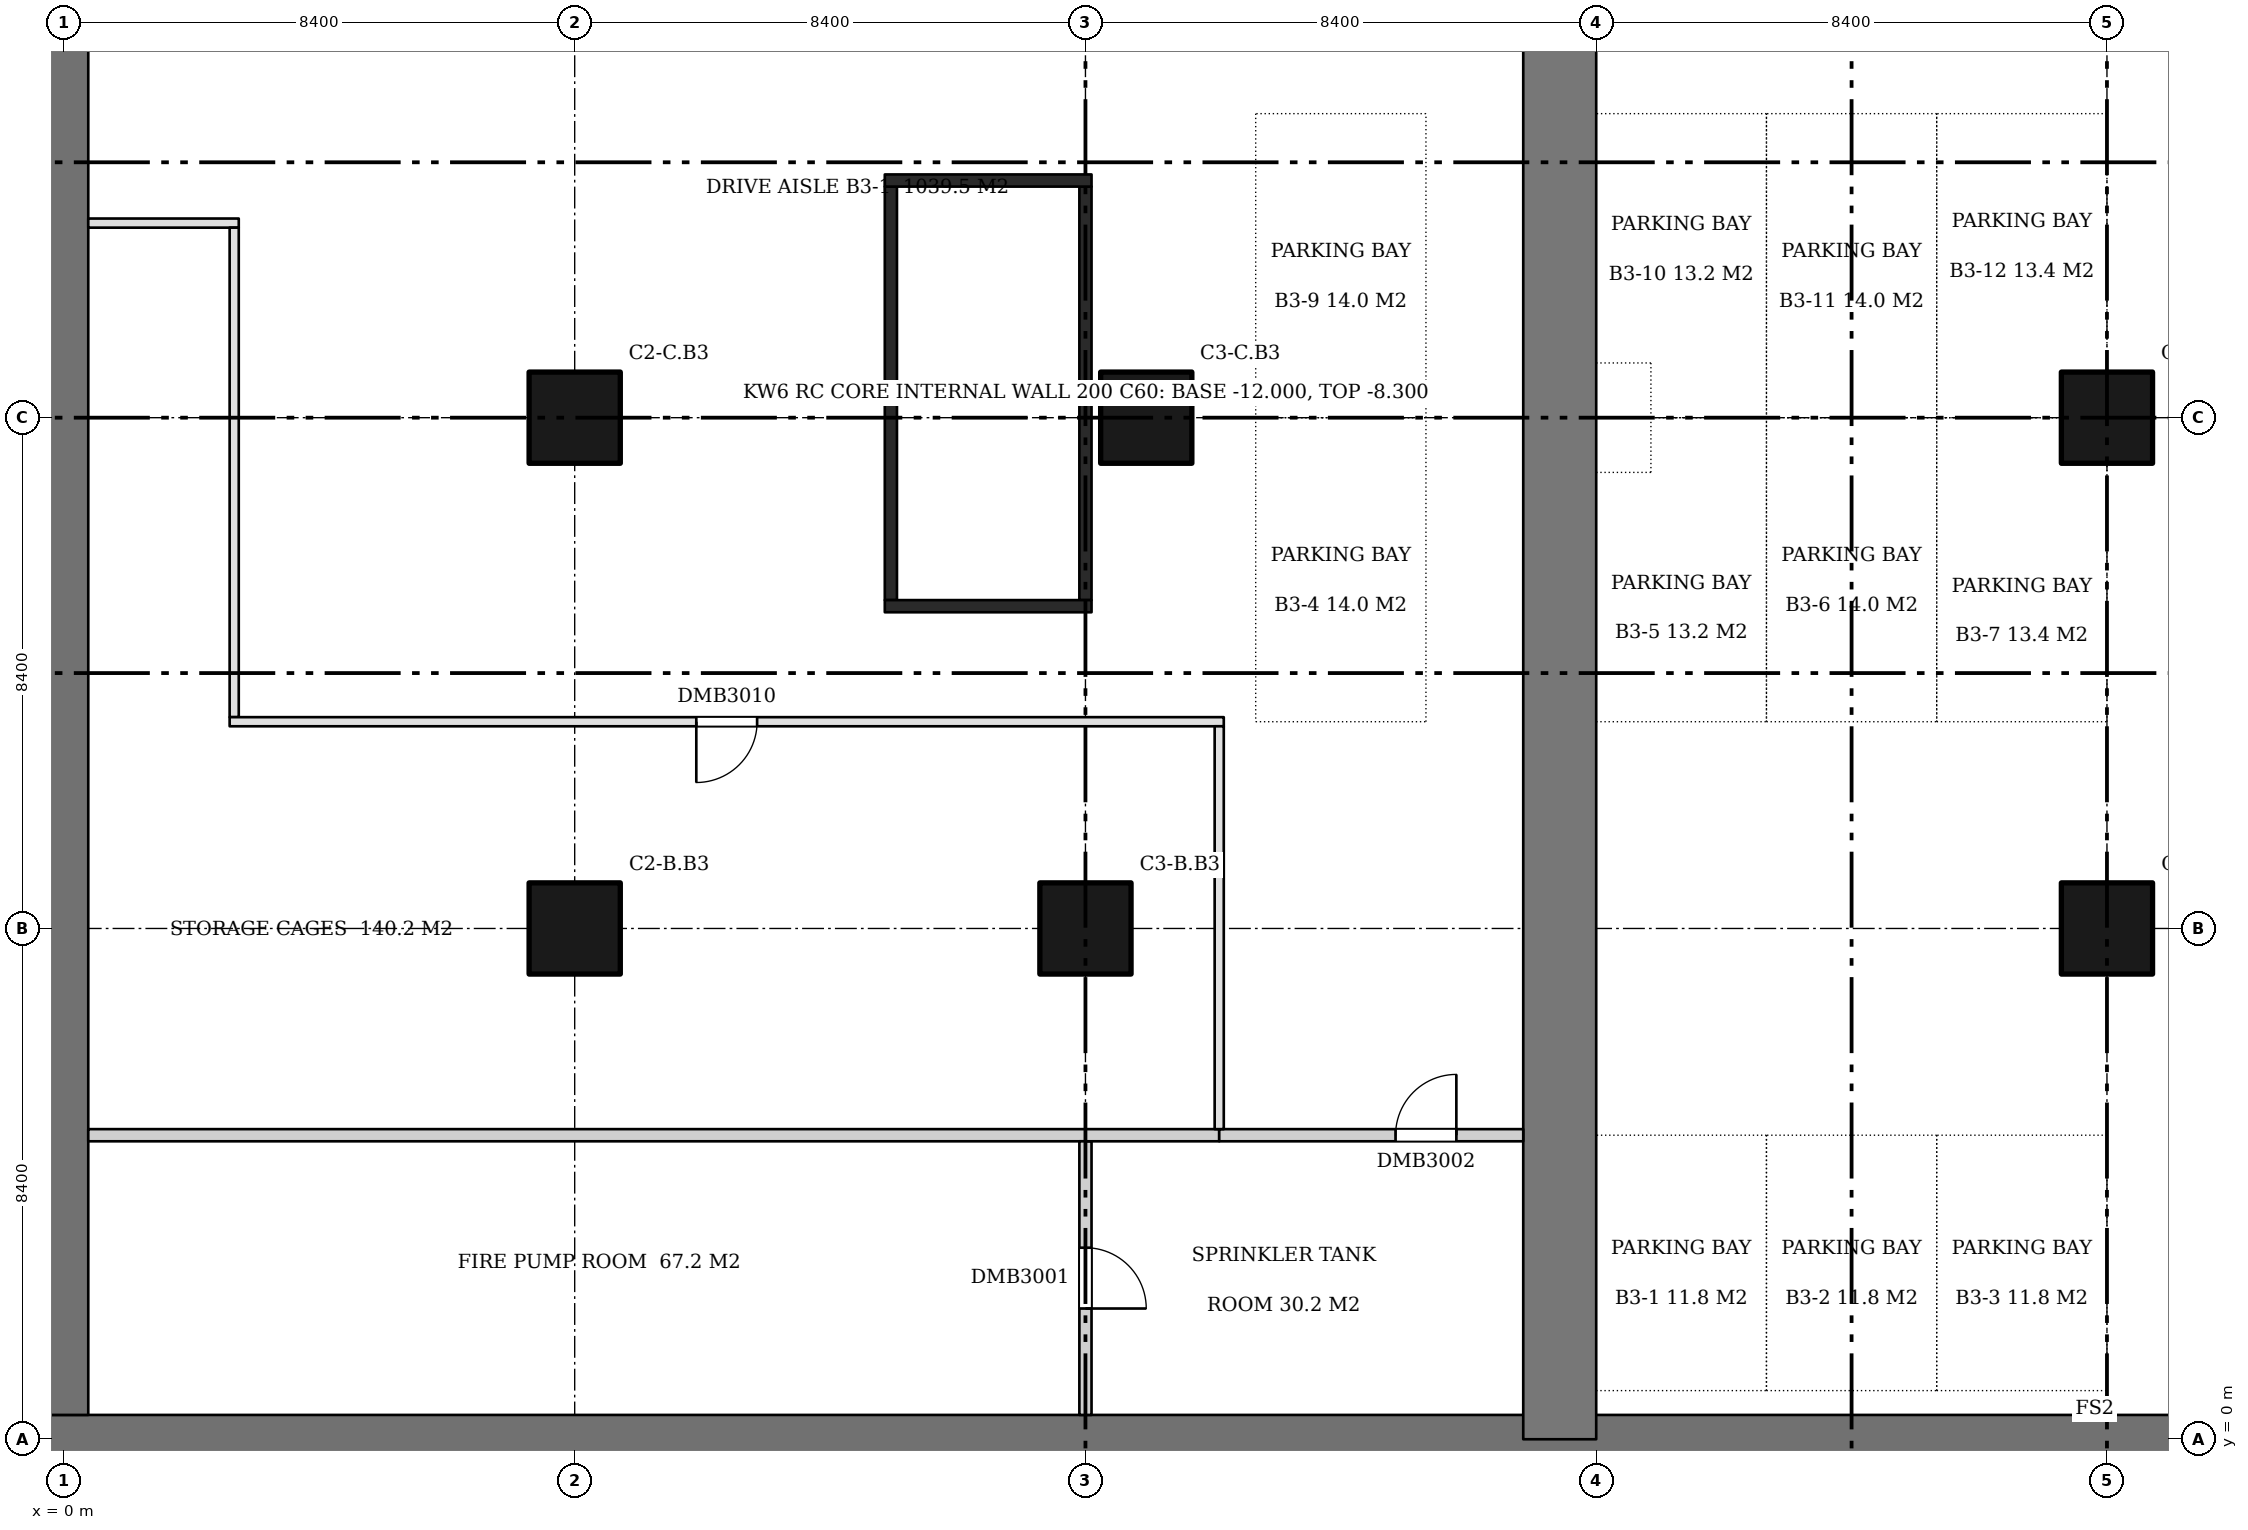
"""IFC4 building model, lengths in metres.
Left out: names, types, materials, properties, quantities, classifications, styles, units other than length and angle.
Written with IfcOpenShell. Run it as: python <this file> out.ifc"""

import sys

from ifc_helpers import new_model, si_unit, direction, frame, frame_2d, origin, origin_2d, place, context, subcontext, project, spatial, rectangle, extrude, element, fill, save


model = new_model("IFC4")
c1 = context("Model", 3, precision=1e-05, world=origin(), true_north=direction((0.0, 1.0)))
c2 = subcontext(c1, "Body", "Model", "MODEL_VIEW")
j1 = project(units=[si_unit("LENGTHUNIT", "METRE"), si_unit("PLANEANGLEUNIT", "RADIAN")], contexts=[c1])
p1 = place(None, origin())
s1 = spatial("IfcSite", under=j1, at=p1, CompositionType="ELEMENT")
p2 = place(p1, origin())
s2 = spatial("IfcBuilding", under=s1, at=p2, CompositionType="ELEMENT")
p3 = place(p2, frame((0.0, 0.0, -12.0)))
s3 = spatial("IfcBuildingStorey", under=s2, at=p3, CompositionType="ELEMENT", Elevation=-12.0)
p4 = place(p3, frame((-0.4, 0.0, 0.0), z_axis=(0.0, 0.0, 1.0), x_axis=(1.0, 0.0, 0.0)))
e1 = element("IfcWall", 1, at=p4, inside=s3, PredefinedType="SOLIDWALL", context=c2, shape_type="SweptSolid", body=[
    extrude(rectangle(XDim=67.6, YDim=0.8, at=frame_2d((33.8, 0.0))), origin(), (0.0, 0.0, 1.0), 3.7),
])
p5 = place(p3, frame((0.0, 0.4, 0.0), z_axis=(0.0, 0.0, 1.0), x_axis=(0.0, 1.0, 0.0)))
e2 = element("IfcWall", 2, at=p5, inside=s3, PredefinedType="SOLIDWALL", context=c2, shape_type="SweptSolid", body=[
    extrude(rectangle(XDim=58.0, YDim=0.8, at=frame_2d((29.0, 0.0))), origin(), (0.0, 0.0, 1.0), 3.7),
])
p6 = place(p3, frame((24.6, 0.0, 0.0), z_axis=(0.0, 0.0, 1.0), x_axis=(0.0, 1.0, 0.0)))
e3 = element("IfcWall", 3, at=p6, inside=s3, PredefinedType="SHEAR", context=c2, shape_type="SweptSolid", body=[
    extrude(rectangle(XDim=25.2, YDim=1.2, at=frame_2d((12.6, 0.0))), origin(), (0.0, 0.0, 1.0), 3.7),
])
for number, where, z_axis, x_axis in (
    (4, (8.4, 8.4, 0.0), (0.0, 0.0, 1.0), (1.0, 0.0, 0.0)),
    (5, (8.4, 16.8, 0.0), (0.0, 0.0, 1.0), (1.0, 0.0, 0.0)),
    (6, (16.8, 8.4, 0.0), (0.0, 0.0, 1.0), (1.0, 0.0, 0.0)),
    (7, (17.8, 16.8, 0.0), (0.0, 0.0, 1.0), (1.0, 0.0, 0.0)),
    (8, (33.6, 8.4, 0.0), (0.0, 0.0, 1.0), (1.0, 0.0, 0.0)),
    (9, (33.6, 16.8, 0.0), (0.0, 0.0, 1.0), (1.0, 0.0, 0.0)),
):
    element("IfcColumn", number, at=place(p3, frame(where, z_axis=z_axis, x_axis=x_axis)), inside=s3, PredefinedType="COLUMN", context=c2, shape_type="SweptSolid", body=[
        extrude(rectangle(XDim=1.5, YDim=1.5, at=origin_2d()), origin(), (0.0, 0.0, 1.0), 3.7),
    ])
for number, where, z_axis, x_axis in (
    (10, (13.6, 13.8, 0.0), (0.0, 0.0, 1.0), (0.0, 1.0, 0.0)),
    (11, (16.8, 13.8, 0.0), (0.0, 0.0, 1.0), (0.0, 1.0, 0.0)),
):
    element("IfcWall", number, at=place(p3, frame(where, z_axis=z_axis, x_axis=x_axis)), inside=s3, PredefinedType="SHEAR", context=c2, shape_type="SweptSolid", body=[
        extrude(rectangle(XDim=6.8, YDim=0.2, at=frame_2d((3.4, 0.0))), origin(), (0.0, 0.0, 1.0), 3.7),
    ])
for number, where, z_axis, x_axis in (
    (12, (13.5, 13.7, 0.0), (0.0, 0.0, 1.0), (1.0, 0.0, 0.0)),
    (13, (13.5, 20.7, 0.0), (0.0, 0.0, 1.0), (1.0, 0.0, 0.0)),
):
    element("IfcWall", number, at=place(p3, frame(where, z_axis=z_axis, x_axis=x_axis)), inside=s3, PredefinedType="SHEAR", context=c2, shape_type="SweptSolid", body=[
        extrude(rectangle(XDim=3.4, YDim=0.2, at=frame_2d((1.7, 0.0))), origin(), (0.0, 0.0, 1.0), 3.7),
    ])
p7 = place(p3, frame((0.4, 5.0, 0.0), z_axis=(0.0, 0.0, 1.0), x_axis=(1.0, 0.0, 0.0)))
e14 = element("IfcWall", 14, at=p7, inside=s3, PredefinedType="PARTITIONING", context=c2, shape_type="SweptSolid", body=[
    extrude(rectangle(XDim=16.4, YDim=0.2, at=frame_2d((8.2, 0.0))), origin(), (0.0, 0.0, 1.0), 3.7),
])
p8 = place(p3, frame((0.4, 20.0, 0.0), z_axis=(0.0, 0.0, 1.0), x_axis=(1.0, 0.0, 0.0)))
e15 = element("IfcWall", 15, at=p8, inside=s3, PredefinedType="PARTITIONING", context=c2, shape_type="SweptSolid", body=[
    extrude(rectangle(XDim=2.475, YDim=0.15, at=frame_2d((1.238, 0.0))), origin(), (0.0, 0.0, 1.0), 3.7),
])
p9 = place(p3, frame((2.8, 11.875, 0.0), z_axis=(0.0, 0.0, 1.0), x_axis=(0.0, 1.0, 0.0)))
e16 = element("IfcWall", 16, at=p9, inside=s3, PredefinedType="PARTITIONING", context=c2, shape_type="SweptSolid", body=[
    extrude(rectangle(XDim=8.05, YDim=0.15, at=frame_2d((4.025, 0.0))), origin(), (0.0, 0.0, 1.0), 3.7),
])
p10 = place(p3, frame((2.725, 11.8, 0.0), z_axis=(0.0, 0.0, 1.0), x_axis=(1.0, 0.0, 0.0)))
e17 = element("IfcWall", 17, at=p10, inside=s3, PredefinedType="PARTITIONING", context=c2, shape_type="SweptSolid", body=[
    extrude(rectangle(XDim=16.35, YDim=0.15, at=frame_2d((8.175, 0.0))), origin(), (0.0, 0.0, 1.0), 3.7),
])
p11 = place(p10, frame((7.675, 0.0, 0.0)))
e18 = element("IfcOpeningElement", 18, at=p11, cuts=e17, PredefinedType="OPENING", context=c2, shape_type="SweptSolid", body=[
    extrude(rectangle(XDim=1.0, YDim=2.1, at=frame_2d((0.5, 1.05))), frame((0.0, 0.085, 0.0), z_axis=(0.0, -1.0, 0.0), x_axis=(1.0, 0.0, 0.0)), (0.0, 0.0, 1.0), 0.17),
])
p12 = place(p3, frame((16.8, 0.4, 0.0), z_axis=(0.0, 0.0, 1.0), x_axis=(0.0, 1.0, 0.0)))
e19 = element("IfcWall", 19, at=p12, inside=s3, PredefinedType="PARTITIONING", context=c2, shape_type="SweptSolid", body=[
    extrude(rectangle(XDim=4.5, YDim=0.2, at=frame_2d((2.25, 0.0))), origin(), (0.0, 0.0, 1.0), 3.7),
])
p13 = place(p12, frame((1.75, 0.0, 0.0)))
e20 = element("IfcOpeningElement", 20, at=p13, cuts=e19, PredefinedType="OPENING", context=c2, shape_type="SweptSolid", body=[
    extrude(rectangle(XDim=1.0, YDim=2.1, at=frame_2d((0.5, 1.05))), frame((0.0, 0.11, 0.0), z_axis=(0.0, -1.0, 0.0), x_axis=(1.0, 0.0, 0.0)), (0.0, 0.0, 1.0), 0.22),
])
p14 = place(p3, frame((16.8, 5.0, 0.0), z_axis=(0.0, 0.0, 1.0), x_axis=(1.0, 0.0, 0.0)))
e21 = element("IfcWall", 21, at=p14, inside=s3, PredefinedType="PARTITIONING", context=c2, shape_type="SweptSolid", body=[
    extrude(rectangle(XDim=2.2, YDim=0.2, at=frame_2d((1.1, 0.0))), origin(), (0.0, 0.0, 1.0), 3.7),
])
p15 = place(p3, frame((19.0, 5.1, 0.0), z_axis=(0.0, 0.0, 1.0), x_axis=(0.0, 1.0, 0.0)))
e22 = element("IfcWall", 22, at=p15, inside=s3, PredefinedType="PARTITIONING", context=c2, shape_type="SweptSolid", body=[
    extrude(rectangle(XDim=6.625, YDim=0.15, at=frame_2d((3.312, 0.0))), origin(), (0.0, 0.0, 1.0), 3.7),
])
p16 = place(p3, frame((19.0, 5.0, 0.0), z_axis=(0.0, 0.0, 1.0), x_axis=(1.0, 0.0, 0.0)))
e23 = element("IfcWall", 23, at=p16, inside=s3, PredefinedType="PARTITIONING", context=c2, shape_type="SweptSolid", body=[
    extrude(rectangle(XDim=5.0, YDim=0.2, at=frame_2d((2.5, 0.0))), origin(), (0.0, 0.0, 1.0), 3.7),
])
p17 = place(p16, frame((2.9, 0.0, 0.0)))
e24 = element("IfcOpeningElement", 24, at=p17, cuts=e23, PredefinedType="OPENING", context=c2, shape_type="SweptSolid", body=[
    extrude(rectangle(XDim=1.0, YDim=2.1, at=frame_2d((0.5, 1.05))), frame((0.0, 0.11, 0.0), z_axis=(0.0, -1.0, 0.0), x_axis=(1.0, 0.0, 0.0)), (0.0, 0.0, 1.0), 0.22),
])
p18 = place(p13, frame((1.0, 0.0, 0.0), z_axis=(0.0, 0.0, 1.0), x_axis=(-1.0, 0.0, 0.0)))
e25 = element("IfcDoor", 25, at=p18, inside=s3, OperationType="SINGLE_SWING_RIGHT", PredefinedType="DOOR", context=c2, shape_type="SweptSolid", body=[
    extrude(rectangle(XDim=1.0, YDim=2.1, at=frame_2d((0.5, 1.05))), frame((0.0, 0.025, 0.0), z_axis=(0.0, -1.0, 0.0), x_axis=(1.0, 0.0, 0.0)), (0.0, 0.0, 1.0), 0.05),
])
fill(e20, e25)
p19 = place(p17, origin())
e26 = element("IfcDoor", 26, at=p19, inside=s3, OperationType="SINGLE_SWING_RIGHT", PredefinedType="DOOR", context=c2, shape_type="SweptSolid", body=[
    extrude(rectangle(XDim=1.0, YDim=2.1, at=frame_2d((0.5, 1.05))), frame((0.0, 0.025, 0.0), z_axis=(0.0, -1.0, 0.0), x_axis=(1.0, 0.0, 0.0)), (0.0, 0.0, 1.0), 0.05),
])
fill(e24, e26)
p20 = place(p11, frame((1.0, 0.0, 0.0), z_axis=(0.0, 0.0, 1.0), x_axis=(-1.0, 0.0, 0.0)))
e27 = element("IfcDoor", 27, at=p20, inside=s3, OperationType="SINGLE_SWING_RIGHT", PredefinedType="DOOR", context=c2, shape_type="SweptSolid", body=[
    extrude(rectangle(XDim=1.0, YDim=2.1, at=frame_2d((0.5, 1.05))), frame((0.0, 0.025, 0.0), z_axis=(0.0, -1.0, 0.0), x_axis=(1.0, 0.0, 0.0)), (0.0, 0.0, 1.0), 0.05),
])
fill(e18, e27)
save(model, sys.argv[1])
